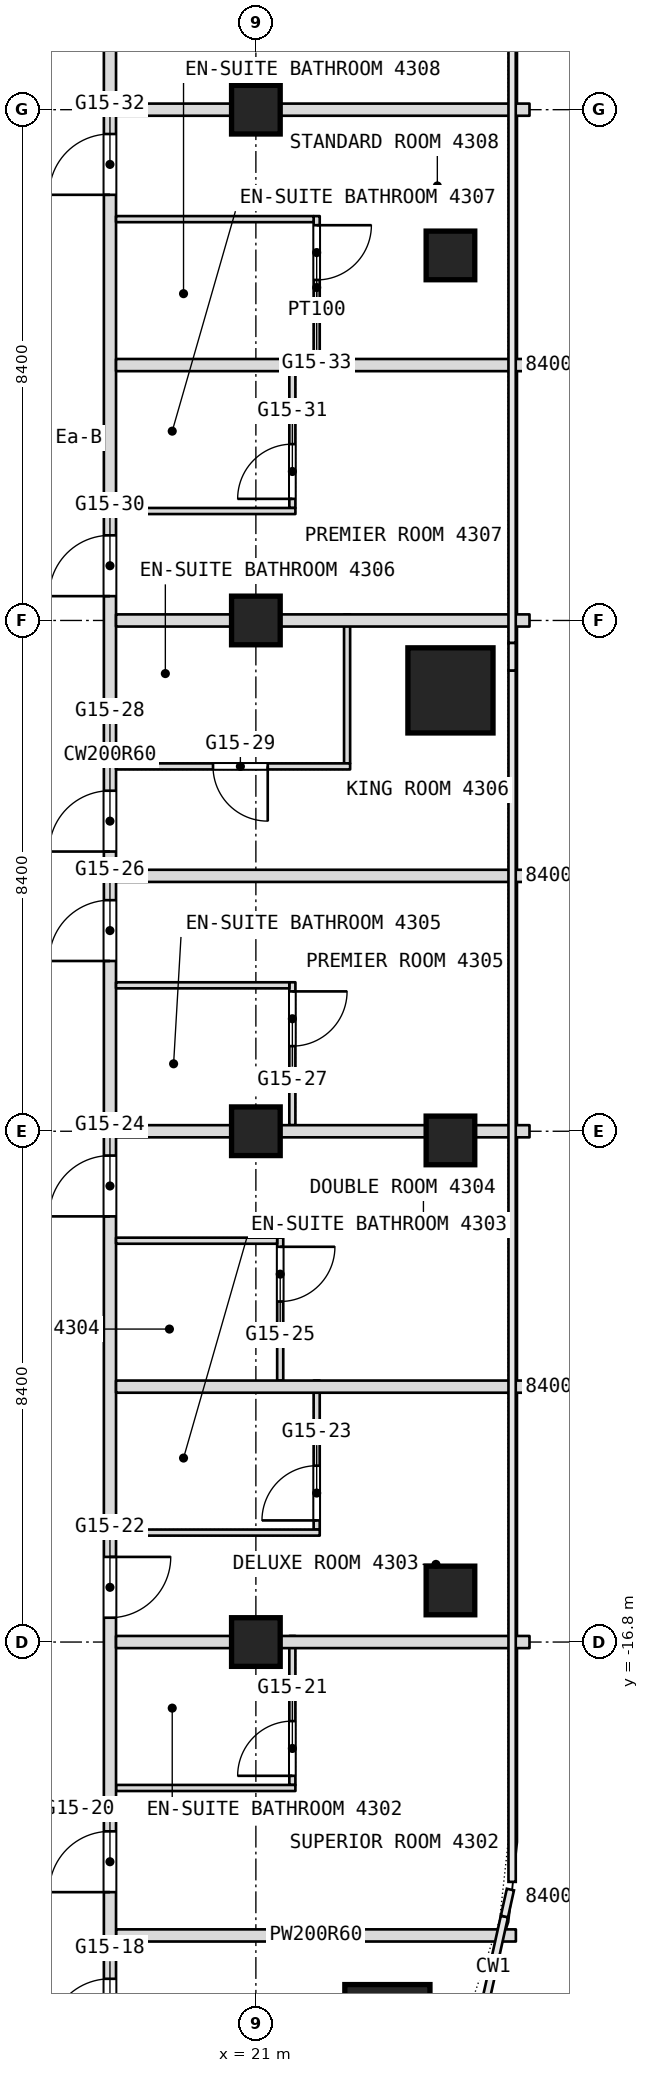
"""IFC4 building model, lengths in metres.
Left out: names, types, materials, properties, quantities, classifications, styles, units other than length and angle.
Written with IfcOpenShell. Run it as: python <this file> out.ifc"""

import sys

from ifc_helpers import new_model, si_unit, direction, frame, frame_2d, origin, origin_2d, place, context, subcontext, project, spatial, rectangle, extrude, element, fill, save


model = new_model("IFC4")
c1 = context("Model", 3, precision=1e-05, world=origin(), true_north=direction((0.0, 1.0)))
c2 = subcontext(c1, "Body", "Model", "MODEL_VIEW")
j1 = project(units=[si_unit("LENGTHUNIT", "METRE"), si_unit("PLANEANGLEUNIT", "RADIAN")], contexts=[c1])
p1 = place(None, origin())
s1 = spatial("IfcSite", under=j1, at=p1, CompositionType="ELEMENT")
p2 = place(p1, origin())
s2 = spatial("IfcBuilding", under=s1, at=p2, CompositionType="ELEMENT")
p3 = place(p2, frame((0.0, 0.0, 191.3)))
s3 = spatial("IfcBuildingStorey", under=s2, at=p3, CompositionType="ELEMENT", Elevation=191.3)
for number, where, z_axis, x_axis in (
    (1, (23.163, -23.133, 0.0), (0.0, 0.0, 1.0), (1.0, 0.0, 0.0)),
    (2, (24.2, -1.15, 0.0), (0.0, 0.0, 1.0), (1.0, 0.0, 0.0)),
):
    element("IfcColumn", number, at=place(p3, frame(where, z_axis=z_axis, x_axis=x_axis)), inside=s3, PredefinedType="COLUMN", context=c2, shape_type="SweptSolid", body=[
        extrude(rectangle(XDim=1.4, YDim=1.4, at=origin_2d()), origin(), (0.0, 0.0, 1.0), 3.6),
    ])
for number, where, z_axis, x_axis in (
    (3, (21.0, -16.8, 0.0), (0.0, 0.0, 1.0), (1.0, 0.0, 0.0)),
    (4, (21.0, -8.4, 0.0), (0.0, 0.0, 1.0), (1.0, 0.0, 0.0)),
    (5, (21.0, 0.0, 0.0), (0.0, 0.0, 1.0), (1.0, 0.0, 0.0)),
    (6, (21.0, 8.4, 0.0), (0.0, 0.0, 1.0), (1.0, 0.0, 0.0)),
    (7, (24.2, 6.003, 0.0), (0.0, 0.0, 1.0), (1.0, 0.0, 0.0)),
    (8, (24.2, -8.551, 0.0), (0.0, 0.0, 1.0), (1.0, 0.0, 0.0)),
    (9, (24.2, -15.952, 0.0), (0.0, 0.0, 1.0), (1.0, 0.0, 0.0)),
):
    element("IfcColumn", number, at=place(p3, frame(where, z_axis=z_axis, x_axis=x_axis)), inside=s3, PredefinedType="COLUMN", context=c2, shape_type="SweptSolid", body=[
        extrude(rectangle(XDim=0.8, YDim=0.8, at=origin_2d()), origin(), (0.0, 0.0, 1.0), 3.6),
    ])
p4 = place(p3, frame((22.5, -2.35, 0.0), z_axis=(0.0, 0.0, 1.0), x_axis=(0.0, 1.0, 0.0)))
e10 = element("IfcWall", 10, at=p4, inside=s3, PredefinedType="PARTITIONING", context=c2, shape_type="SweptSolid", body=[
    extrude(rectangle(XDim=2.45, YDim=0.1, at=frame_2d((1.225, 0.0))), origin(), (0.0, 0.0, 1.0), 3.34),
])
p5 = place(p3, frame((22.0, -14.95, 0.0), z_axis=(0.0, 0.0, 1.0), x_axis=(0.0, 1.0, 0.0)))
e11 = element("IfcWall", 11, at=p5, inside=s3, PredefinedType="PARTITIONING", context=c2, shape_type="SweptSolid", body=[
    extrude(rectangle(XDim=2.45, YDim=0.1, at=frame_2d((1.225, 0.0))), origin(), (0.0, 0.0, 1.0), 3.34),
])
p6 = place(p5, frame((0.15, 0.0, 0.0)))
e12 = element("IfcOpeningElement", 12, at=p6, cuts=e11, PredefinedType="OPENING", context=c2, shape_type="SweptSolid", body=[
    extrude(rectangle(XDim=0.9, YDim=2.1, at=frame_2d((0.45, 1.05))), frame((0.0, 0.05, 0.0), z_axis=(0.0, -1.0, 0.0), x_axis=(1.0, 0.0, 0.0)), (0.0, 0.0, 1.0), 0.1),
])
p7 = place(p3, frame((22.0, 4.3, 0.0), z_axis=(0.0, 0.0, 1.0), x_axis=(0.0, 1.0, 0.0)))
e13 = element("IfcWall", 13, at=p7, inside=s3, PredefinedType="PARTITIONING", context=c2, shape_type="SweptSolid", body=[
    extrude(rectangle(XDim=2.35, YDim=0.1, at=frame_2d((1.175, 0.0))), origin(), (0.0, 0.0, 1.0), 3.34),
])
p8 = place(p7, frame((1.3, 0.0, 0.0)))
e14 = element("IfcOpeningElement", 14, at=p8, cuts=e13, PredefinedType="OPENING", context=c2, shape_type="SweptSolid", body=[
    extrude(rectangle(XDim=0.9, YDim=2.1, at=frame_2d((0.45, 1.05))), frame((0.0, 0.05, 0.0), z_axis=(0.0, -1.0, 0.0), x_axis=(1.0, 0.0, 0.0)), (0.0, 0.0, 1.0), 0.1),
])
p9 = place(p3, frame((18.7, -21.625, 0.0), z_axis=(0.0, 0.0, 1.0), x_axis=(1.0, 0.0, 0.0)))
e15 = element("IfcWall", 15, at=p9, inside=s3, PredefinedType="PARTITIONING", context=c2, shape_type="SweptSolid", body=[
    extrude(rectangle(XDim=6.576, YDim=0.2, at=frame_2d((3.288, 0.0))), origin(), (0.0, 0.0, 1.0), 3.34),
])
p10 = place(p3, frame((21.6, -19.15, 0.0), z_axis=(0.0, 0.0, 1.0), x_axis=(0.0, 1.0, 0.0)))
e16 = element("IfcWall", 16, at=p10, inside=s3, PredefinedType="PARTITIONING", context=c2, shape_type="SweptSolid", body=[
    extrude(rectangle(XDim=2.45, YDim=0.1, at=frame_2d((1.225, 0.0))), origin(), (0.0, 0.0, 1.0), 3.34),
])
p11 = place(p10, frame((0.15, 0.0, 0.0)))
e17 = element("IfcOpeningElement", 17, at=p11, cuts=e16, PredefinedType="OPENING", context=c2, shape_type="SweptSolid", body=[
    extrude(rectangle(XDim=0.9, YDim=2.1, at=frame_2d((0.45, 1.05))), frame((0.0, 0.05, 0.0), z_axis=(0.0, -1.0, 0.0), x_axis=(1.0, 0.0, 0.0)), (0.0, 0.0, 1.0), 0.1),
])
p12 = place(p3, frame((21.6, -8.3, 0.0), z_axis=(0.0, 0.0, 1.0), x_axis=(0.0, 1.0, 0.0)))
e18 = element("IfcWall", 18, at=p12, inside=s3, PredefinedType="PARTITIONING", context=c2, shape_type="SweptSolid", body=[
    extrude(rectangle(XDim=2.35, YDim=0.1, at=frame_2d((1.175, 0.0))), origin(), (0.0, 0.0, 1.0), 3.34),
])
p13 = place(p12, frame((1.3, 0.0, 0.0)))
e19 = element("IfcOpeningElement", 19, at=p13, cuts=e18, PredefinedType="OPENING", context=c2, shape_type="SweptSolid", body=[
    extrude(rectangle(XDim=0.9, YDim=2.1, at=frame_2d((0.45, 1.05))), frame((0.0, 0.05, 0.0), z_axis=(0.0, -1.0, 0.0), x_axis=(1.0, 0.0, 0.0)), (0.0, 0.0, 1.0), 0.1),
])
p14 = place(p3, frame((21.6, 1.85, 0.0), z_axis=(0.0, 0.0, 1.0), x_axis=(0.0, 1.0, 0.0)))
e20 = element("IfcWall", 20, at=p14, inside=s3, PredefinedType="PARTITIONING", context=c2, shape_type="SweptSolid", body=[
    extrude(rectangle(XDim=2.45, YDim=0.1, at=frame_2d((1.225, 0.0))), origin(), (0.0, 0.0, 1.0), 3.34),
])
p15 = place(p14, frame((0.15, 0.0, 0.0)))
e21 = element("IfcOpeningElement", 21, at=p15, cuts=e20, PredefinedType="OPENING", context=c2, shape_type="SweptSolid", body=[
    extrude(rectangle(XDim=0.9, YDim=2.1, at=frame_2d((0.45, 1.05))), frame((0.0, 0.05, 0.0), z_axis=(0.0, -1.0, 0.0), x_axis=(1.0, 0.0, 0.0)), (0.0, 0.0, 1.0), 0.1),
])
p16 = place(p3, frame((21.4, -12.5, 0.0), z_axis=(0.0, 0.0, 1.0), x_axis=(0.0, 1.0, 0.0)))
e22 = element("IfcWall", 22, at=p16, inside=s3, PredefinedType="PARTITIONING", context=c2, shape_type="SweptSolid", body=[
    extrude(rectangle(XDim=2.35, YDim=0.1, at=frame_2d((1.175, 0.0))), origin(), (0.0, 0.0, 1.0), 3.34),
])
p17 = place(p16, frame((1.3, 0.0, 0.0)))
e23 = element("IfcOpeningElement", 23, at=p17, cuts=e22, PredefinedType="OPENING", context=c2, shape_type="SweptSolid", body=[
    extrude(rectangle(XDim=0.9, YDim=2.1, at=frame_2d((0.45, 1.05))), frame((0.0, 0.05, 0.0), z_axis=(0.0, -1.0, 0.0), x_axis=(1.0, 0.0, 0.0)), (0.0, 0.0, 1.0), 0.1),
])
p18 = place(p3, frame((18.7, -19.2, 0.0), z_axis=(0.0, 0.0, 1.0), x_axis=(1.0, 0.0, 0.0)))
e24 = element("IfcWall", 24, at=p18, inside=s3, PredefinedType="PARTITIONING", context=c2, shape_type="SweptSolid", body=[
    extrude(rectangle(XDim=2.95, YDim=0.1, at=frame_2d((1.475, 0.0))), origin(), (0.0, 0.0, 1.0), 3.34),
])
p19 = place(p3, frame((18.6, -26.751, 0.0), z_axis=(0.0, 0.0, 1.0), x_axis=(0.0, 1.0, 0.0)))
e25 = element("IfcWall", 25, at=p19, inside=s3, PredefinedType="PARTITIONING", context=c2, shape_type="SweptSolid", body=[
    extrude(rectangle(XDim=49.091, YDim=0.2, at=frame_2d((24.545, 0.0))), origin(), (0.0, 0.0, 1.0), 3.34),
])
p20 = place(p19, frame((3.413, 0.0, 0.0)))
e26 = element("IfcOpeningElement", 26, at=p20, cuts=e25, PredefinedType="OPENING", context=c2, shape_type="SweptSolid", body=[
    extrude(rectangle(XDim=1.0, YDim=2.1, at=frame_2d((0.5, 1.05))), frame((0.0, 0.1, 0.0), z_axis=(0.0, -1.0, 0.0), x_axis=(1.0, 0.0, 0.0)), (0.0, 0.0, 1.0), 0.2),
])
p21 = place(p19, frame((5.838, 0.0, 0.0)))
e27 = element("IfcOpeningElement", 27, at=p21, cuts=e25, PredefinedType="OPENING", context=c2, shape_type="SweptSolid", body=[
    extrude(rectangle(XDim=1.0, YDim=2.1, at=frame_2d((0.5, 1.05))), frame((0.0, 0.1, 0.0), z_axis=(0.0, -1.0, 0.0), x_axis=(1.0, 0.0, 0.0)), (0.0, 0.0, 1.0), 0.2),
])
p22 = place(p19, frame((10.351, 0.0, 0.0)))
e28 = element("IfcOpeningElement", 28, at=p22, cuts=e25, PredefinedType="OPENING", context=c2, shape_type="SweptSolid", body=[
    extrude(rectangle(XDim=1.0, YDim=2.1, at=frame_2d((0.5, 1.05))), frame((0.0, 0.1, 0.0), z_axis=(0.0, -1.0, 0.0), x_axis=(1.0, 0.0, 0.0)), (0.0, 0.0, 1.0), 0.2),
])
p23 = place(p19, frame((16.951, 0.0, 0.0)))
e29 = element("IfcOpeningElement", 29, at=p23, cuts=e25, PredefinedType="OPENING", context=c2, shape_type="SweptSolid", body=[
    extrude(rectangle(XDim=1.0, YDim=2.1, at=frame_2d((0.5, 1.05))), frame((0.0, 0.1, 0.0), z_axis=(0.0, -1.0, 0.0), x_axis=(1.0, 0.0, 0.0)), (0.0, 0.0, 1.0), 0.2),
])
p24 = place(p19, frame((21.151, 0.0, 0.0)))
e30 = element("IfcOpeningElement", 30, at=p24, cuts=e25, PredefinedType="OPENING", context=c2, shape_type="SweptSolid", body=[
    extrude(rectangle(XDim=1.0, YDim=2.1, at=frame_2d((0.5, 1.05))), frame((0.0, 0.1, 0.0), z_axis=(0.0, -1.0, 0.0), x_axis=(1.0, 0.0, 0.0)), (0.0, 0.0, 1.0), 0.2),
])
p25 = place(p19, frame((22.951, 0.0, 0.0)))
e31 = element("IfcOpeningElement", 31, at=p25, cuts=e25, PredefinedType="OPENING", context=c2, shape_type="SweptSolid", body=[
    extrude(rectangle(XDim=1.0, YDim=2.1, at=frame_2d((0.5, 1.05))), frame((0.0, 0.1, 0.0), z_axis=(0.0, -1.0, 0.0), x_axis=(1.0, 0.0, 0.0)), (0.0, 0.0, 1.0), 0.2),
])
p26 = place(p19, frame((27.151, 0.0, 0.0)))
e32 = element("IfcOpeningElement", 32, at=p26, cuts=e25, PredefinedType="OPENING", context=c2, shape_type="SweptSolid", body=[
    extrude(rectangle(XDim=1.0, YDim=2.1, at=frame_2d((0.5, 1.05))), frame((0.0, 0.1, 0.0), z_axis=(0.0, -1.0, 0.0), x_axis=(1.0, 0.0, 0.0)), (0.0, 0.0, 1.0), 0.2),
])
p27 = place(p19, frame((33.751, 0.0, 0.0)))
e33 = element("IfcOpeningElement", 33, at=p27, cuts=e25, PredefinedType="OPENING", context=c2, shape_type="SweptSolid", body=[
    extrude(rectangle(XDim=1.0, YDim=2.1, at=frame_2d((0.5, 1.05))), frame((0.0, 0.1, 0.0), z_axis=(0.0, -1.0, 0.0), x_axis=(1.0, 0.0, 0.0)), (0.0, 0.0, 1.0), 0.2),
])
p28 = place(p19, frame((38.451, 0.0, 0.0)))
e34 = element("IfcOpeningElement", 34, at=p28, cuts=e25, PredefinedType="OPENING", context=c2, shape_type="SweptSolid", body=[
    extrude(rectangle(XDim=1.8, YDim=2.1, at=frame_2d((0.9, 1.05))), frame((0.0, 0.1, 0.0), z_axis=(0.0, -1.0, 0.0), x_axis=(1.0, 0.0, 0.0)), (0.0, 0.0, 1.0), 0.2),
])
p29 = place(p19, frame((44.051, 0.0, 0.0)))
e35 = element("IfcOpeningElement", 35, at=p29, cuts=e25, PredefinedType="OPENING", context=c2, shape_type="SweptSolid", body=[
    extrude(rectangle(XDim=1.0, YDim=2.1, at=frame_2d((0.5, 1.05))), frame((0.0, 0.1, 0.0), z_axis=(0.0, -1.0, 0.0), x_axis=(1.0, 0.0, 0.0)), (0.0, 0.0, 1.0), 0.2),
])
p30 = place(p3, frame((18.7, -16.8, 0.0), z_axis=(0.0, 0.0, 1.0), x_axis=(1.0, 0.0, 0.0)))
e36 = element("IfcWall", 36, at=p30, inside=s3, PredefinedType="PARTITIONING", context=c2, shape_type="SweptSolid", body=[
    extrude(rectangle(XDim=6.8, YDim=0.2, at=frame_2d((3.4, 0.0))), origin(), (0.0, 0.0, 1.0), 2.94),
])
p31 = place(p3, frame((18.7, -15.0, 0.0), z_axis=(0.0, 0.0, 1.0), x_axis=(1.0, 0.0, 0.0)))
e37 = element("IfcWall", 37, at=p31, inside=s3, PredefinedType="PARTITIONING", context=c2, shape_type="SweptSolid", body=[
    extrude(rectangle(XDim=3.35, YDim=0.1, at=frame_2d((1.675, 0.0))), origin(), (0.0, 0.0, 1.0), 3.34),
])
p32 = place(p3, frame((18.7, -12.6, 0.0), z_axis=(0.0, 0.0, 1.0), x_axis=(1.0, 0.0, 0.0)))
e38 = element("IfcWall", 38, at=p32, inside=s3, PredefinedType="PARTITIONING", context=c2, shape_type="SweptSolid", body=[
    extrude(rectangle(XDim=6.8, YDim=0.2, at=frame_2d((3.4, 0.0))), origin(), (0.0, 0.0, 1.0), 3.34),
])
p33 = place(p3, frame((18.7, -10.2, 0.0), z_axis=(0.0, 0.0, 1.0), x_axis=(1.0, 0.0, 0.0)))
e39 = element("IfcWall", 39, at=p33, inside=s3, PredefinedType="PARTITIONING", context=c2, shape_type="SweptSolid", body=[
    extrude(rectangle(XDim=2.65, YDim=0.1, at=frame_2d((1.325, 0.0))), origin(), (0.0, 0.0, 1.0), 3.34),
])
p34 = place(p3, frame((18.7, -8.4, 0.0), z_axis=(0.0, 0.0, 1.0), x_axis=(1.0, 0.0, 0.0)))
e40 = element("IfcWall", 40, at=p34, inside=s3, PredefinedType="PARTITIONING", context=c2, shape_type="SweptSolid", body=[
    extrude(rectangle(XDim=6.8, YDim=0.2, at=frame_2d((3.4, 0.0))), origin(), (0.0, 0.0, 1.0), 2.94),
])
p35 = place(p3, frame((18.7, -6.0, 0.0), z_axis=(0.0, 0.0, 1.0), x_axis=(1.0, 0.0, 0.0)))
e41 = element("IfcWall", 41, at=p35, inside=s3, PredefinedType="PARTITIONING", context=c2, shape_type="SweptSolid", body=[
    extrude(rectangle(XDim=2.85, YDim=0.1, at=frame_2d((1.425, 0.0))), origin(), (0.0, 0.0, 1.0), 3.34),
])
p36 = place(p3, frame((18.7, -4.2, 0.0), z_axis=(0.0, 0.0, 1.0), x_axis=(1.0, 0.0, 0.0)))
e42 = element("IfcWall", 42, at=p36, inside=s3, PredefinedType="PARTITIONING", context=c2, shape_type="SweptSolid", body=[
    extrude(rectangle(XDim=6.8, YDim=0.2, at=frame_2d((3.4, 0.0))), origin(), (0.0, 0.0, 1.0), 3.34),
])
p37 = place(p3, frame((18.7, -2.4, 0.0), z_axis=(0.0, 0.0, 1.0), x_axis=(1.0, 0.0, 0.0)))
e43 = element("IfcWall", 43, at=p37, inside=s3, PredefinedType="PARTITIONING", context=c2, shape_type="SweptSolid", body=[
    extrude(rectangle(XDim=3.85, YDim=0.1, at=frame_2d((1.925, 0.0))), origin(), (0.0, 0.0, 1.0), 3.34),
])
p38 = place(p37, frame((1.595, 0.0, 0.0)))
e44 = element("IfcOpeningElement", 44, at=p38, cuts=e43, PredefinedType="OPENING", context=c2, shape_type="SweptSolid", body=[
    extrude(rectangle(XDim=0.9, YDim=2.1, at=frame_2d((0.45, 1.05))), frame((0.0, 0.05, 0.0), z_axis=(0.0, -1.0, 0.0), x_axis=(1.0, 0.0, 0.0)), (0.0, 0.0, 1.0), 0.1),
])
p39 = place(p3, frame((18.7, 0.0, 0.0), z_axis=(0.0, 0.0, 1.0), x_axis=(1.0, 0.0, 0.0)))
e45 = element("IfcWall", 45, at=p39, inside=s3, PredefinedType="PARTITIONING", context=c2, shape_type="SweptSolid", body=[
    extrude(rectangle(XDim=6.8, YDim=0.2, at=frame_2d((3.4, 0.0))), origin(), (0.0, 0.0, 1.0), 2.94),
])
p40 = place(p3, frame((18.7, 1.8, 0.0), z_axis=(0.0, 0.0, 1.0), x_axis=(1.0, 0.0, 0.0)))
e46 = element("IfcWall", 46, at=p40, inside=s3, PredefinedType="PARTITIONING", context=c2, shape_type="SweptSolid", body=[
    extrude(rectangle(XDim=2.95, YDim=0.1, at=frame_2d((1.475, 0.0))), origin(), (0.0, 0.0, 1.0), 3.34),
])
p41 = place(p3, frame((18.7, 4.2, 0.0), z_axis=(0.0, 0.0, 1.0), x_axis=(1.0, 0.0, 0.0)))
e47 = element("IfcWall", 47, at=p41, inside=s3, PredefinedType="PARTITIONING", context=c2, shape_type="SweptSolid", body=[
    extrude(rectangle(XDim=6.8, YDim=0.2, at=frame_2d((3.4, 0.0))), origin(), (0.0, 0.0, 1.0), 3.34),
])
p42 = place(p3, frame((18.7, 6.6, 0.0), z_axis=(0.0, 0.0, 1.0), x_axis=(1.0, 0.0, 0.0)))
e48 = element("IfcWall", 48, at=p42, inside=s3, PredefinedType="PARTITIONING", context=c2, shape_type="SweptSolid", body=[
    extrude(rectangle(XDim=3.25, YDim=0.1, at=frame_2d((1.625, 0.0))), origin(), (0.0, 0.0, 1.0), 3.34),
])
p43 = place(p3, frame((18.7, 8.4, 0.0), z_axis=(0.0, 0.0, 1.0), x_axis=(1.0, 0.0, 0.0)))
e49 = element("IfcWall", 49, at=p43, inside=s3, PredefinedType="PARTITIONING", context=c2, shape_type="SweptSolid", body=[
    extrude(rectangle(XDim=6.8, YDim=0.2, at=frame_2d((3.4, 0.0))), origin(), (0.0, 0.0, 1.0), 2.94),
])
p44 = place(p6, origin())
e50 = element("IfcDoor", 50, at=p44, inside=s3, OperationType="SINGLE_SWING_LEFT", PredefinedType="DOOR", context=c2, shape_type="SweptSolid", body=[
    extrude(rectangle(XDim=0.9, YDim=2.1, at=frame_2d((0.45, 1.05))), frame((0.0, 0.025, 0.0), z_axis=(0.0, -1.0, 0.0), x_axis=(1.0, 0.0, 0.0)), (0.0, 0.0, 1.0), 0.05),
])
fill(e12, e50)
p45 = place(p8, origin())
e51 = element("IfcDoor", 51, at=p45, inside=s3, OperationType="SINGLE_SWING_RIGHT", PredefinedType="DOOR", context=c2, shape_type="SweptSolid", body=[
    extrude(rectangle(XDim=0.9, YDim=2.1, at=frame_2d((0.45, 1.05))), frame((0.0, 0.025, 0.0), z_axis=(0.0, -1.0, 0.0), x_axis=(1.0, 0.0, 0.0)), (0.0, 0.0, 1.0), 0.05),
])
fill(e14, e51)
p46 = place(p11, origin())
e52 = element("IfcDoor", 52, at=p46, inside=s3, OperationType="SINGLE_SWING_LEFT", PredefinedType="DOOR", context=c2, shape_type="SweptSolid", body=[
    extrude(rectangle(XDim=0.9, YDim=2.1, at=frame_2d((0.45, 1.05))), frame((0.0, 0.025, 0.0), z_axis=(0.0, -1.0, 0.0), x_axis=(1.0, 0.0, 0.0)), (0.0, 0.0, 1.0), 0.05),
])
fill(e17, e52)
p47 = place(p13, origin())
e53 = element("IfcDoor", 53, at=p47, inside=s3, OperationType="SINGLE_SWING_RIGHT", PredefinedType="DOOR", context=c2, shape_type="SweptSolid", body=[
    extrude(rectangle(XDim=0.9, YDim=2.1, at=frame_2d((0.45, 1.05))), frame((0.0, 0.025, 0.0), z_axis=(0.0, -1.0, 0.0), x_axis=(1.0, 0.0, 0.0)), (0.0, 0.0, 1.0), 0.05),
])
fill(e19, e53)
p48 = place(p15, origin())
e54 = element("IfcDoor", 54, at=p48, inside=s3, OperationType="SINGLE_SWING_LEFT", PredefinedType="DOOR", context=c2, shape_type="SweptSolid", body=[
    extrude(rectangle(XDim=0.9, YDim=2.1, at=frame_2d((0.45, 1.05))), frame((0.0, 0.025, 0.0), z_axis=(0.0, -1.0, 0.0), x_axis=(1.0, 0.0, 0.0)), (0.0, 0.0, 1.0), 0.05),
])
fill(e21, e54)
p49 = place(p17, origin())
e55 = element("IfcDoor", 55, at=p49, inside=s3, OperationType="SINGLE_SWING_RIGHT", PredefinedType="DOOR", context=c2, shape_type="SweptSolid", body=[
    extrude(rectangle(XDim=0.9, YDim=2.1, at=frame_2d((0.45, 1.05))), frame((0.0, 0.025, 0.0), z_axis=(0.0, -1.0, 0.0), x_axis=(1.0, 0.0, 0.0)), (0.0, 0.0, 1.0), 0.05),
])
fill(e23, e55)
p50 = place(p20, origin())
e56 = element("IfcDoor", 56, at=p50, inside=s3, OperationType="SINGLE_SWING_RIGHT", PredefinedType="DOOR", context=c2, shape_type="SweptSolid", body=[
    extrude(rectangle(XDim=1.0, YDim=2.1, at=frame_2d((0.5, 1.05))), frame((0.0, 0.025, 0.0), z_axis=(0.0, -1.0, 0.0), x_axis=(1.0, 0.0, 0.0)), (0.0, 0.0, 1.0), 0.05),
])
fill(e26, e56)
p51 = place(p21, origin())
e57 = element("IfcDoor", 57, at=p51, inside=s3, OperationType="SINGLE_SWING_RIGHT", PredefinedType="DOOR", context=c2, shape_type="SweptSolid", body=[
    extrude(rectangle(XDim=1.0, YDim=2.1, at=frame_2d((0.5, 1.05))), frame((0.0, 0.025, 0.0), z_axis=(0.0, -1.0, 0.0), x_axis=(1.0, 0.0, 0.0)), (0.0, 0.0, 1.0), 0.05),
])
fill(e27, e57)
p52 = place(p22, origin())
e58 = element("IfcDoor", 58, at=p52, inside=s3, OperationType="SINGLE_SWING_RIGHT", PredefinedType="DOOR", context=c2, shape_type="SweptSolid", body=[
    extrude(rectangle(XDim=1.0, YDim=2.1, at=frame_2d((0.5, 1.05))), frame((0.0, 0.025, 0.0), z_axis=(0.0, -1.0, 0.0), x_axis=(1.0, 0.0, 0.0)), (0.0, 0.0, 1.0), 0.05),
])
fill(e28, e58)
p53 = place(p23, origin())
e59 = element("IfcDoor", 59, at=p53, inside=s3, OperationType="SINGLE_SWING_RIGHT", PredefinedType="DOOR", context=c2, shape_type="SweptSolid", body=[
    extrude(rectangle(XDim=1.0, YDim=2.1, at=frame_2d((0.5, 1.05))), frame((0.0, 0.025, 0.0), z_axis=(0.0, -1.0, 0.0), x_axis=(1.0, 0.0, 0.0)), (0.0, 0.0, 1.0), 0.05),
])
fill(e29, e59)
p54 = place(p24, origin())
e60 = element("IfcDoor", 60, at=p54, inside=s3, OperationType="SINGLE_SWING_RIGHT", PredefinedType="DOOR", context=c2, shape_type="SweptSolid", body=[
    extrude(rectangle(XDim=1.0, YDim=2.1, at=frame_2d((0.5, 1.05))), frame((0.0, 0.025, 0.0), z_axis=(0.0, -1.0, 0.0), x_axis=(1.0, 0.0, 0.0)), (0.0, 0.0, 1.0), 0.05),
])
fill(e30, e60)
p55 = place(p25, origin())
e61 = element("IfcDoor", 61, at=p55, inside=s3, OperationType="SINGLE_SWING_RIGHT", PredefinedType="DOOR", context=c2, shape_type="SweptSolid", body=[
    extrude(rectangle(XDim=1.0, YDim=2.1, at=frame_2d((0.5, 1.05))), frame((0.0, 0.025, 0.0), z_axis=(0.0, -1.0, 0.0), x_axis=(1.0, 0.0, 0.0)), (0.0, 0.0, 1.0), 0.05),
])
fill(e31, e61)
p56 = place(p26, origin())
e62 = element("IfcDoor", 62, at=p56, inside=s3, OperationType="SINGLE_SWING_RIGHT", PredefinedType="DOOR", context=c2, shape_type="SweptSolid", body=[
    extrude(rectangle(XDim=1.0, YDim=2.1, at=frame_2d((0.5, 1.05))), frame((0.0, 0.025, 0.0), z_axis=(0.0, -1.0, 0.0), x_axis=(1.0, 0.0, 0.0)), (0.0, 0.0, 1.0), 0.05),
])
fill(e32, e62)
p57 = place(p27, origin())
e63 = element("IfcDoor", 63, at=p57, inside=s3, OperationType="SINGLE_SWING_RIGHT", PredefinedType="DOOR", context=c2, shape_type="SweptSolid", body=[
    extrude(rectangle(XDim=1.0, YDim=2.1, at=frame_2d((0.5, 1.05))), frame((0.0, 0.025, 0.0), z_axis=(0.0, -1.0, 0.0), x_axis=(1.0, 0.0, 0.0)), (0.0, 0.0, 1.0), 0.05),
])
fill(e33, e63)
p58 = place(p38, origin())
e64 = element("IfcDoor", 64, at=p58, inside=s3, OperationType="SINGLE_SWING_RIGHT", PredefinedType="DOOR", context=c2, shape_type="SweptSolid", body=[
    extrude(rectangle(XDim=0.9, YDim=2.1, at=frame_2d((0.45, 1.05))), frame((0.0, 0.025, 0.0), z_axis=(0.0, -1.0, 0.0), x_axis=(1.0, 0.0, 0.0)), (0.0, 0.0, 1.0), 0.05),
])
fill(e44, e64)
save(model, sys.argv[1])
